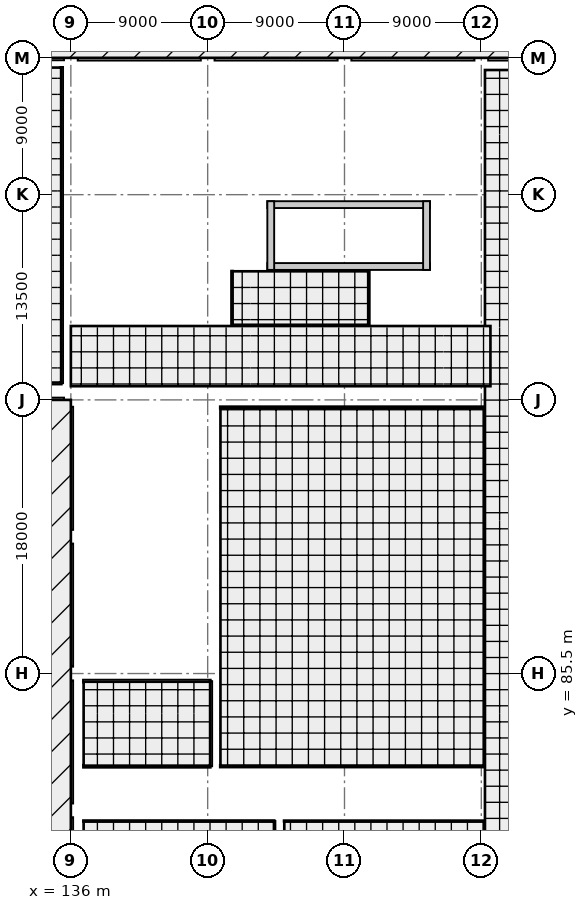
"""IFC4 building model, lengths in metres.
Left out: names, types, materials, properties, quantities, classifications, styles, units other than length and angle.
Written with IfcOpenShell. Run it as: python <this file> out.ifc"""

import sys

from ifc_helpers import new_model, si_unit, direction, frame, frame_2d, origin, origin_2d, place, context, subcontext, project, spatial, rectangle, extrude, element, fill, save


model = new_model("IFC4")
c1 = context("Model", 3, precision=1e-05, world=origin(), true_north=direction((0.0, 1.0)))
c2 = subcontext(c1, "Body", "Model", "MODEL_VIEW")
j1 = project(units=[si_unit("LENGTHUNIT", "METRE"), si_unit("PLANEANGLEUNIT", "RADIAN")], contexts=[c1])
p1 = place(None, origin())
s1 = spatial("IfcSite", under=j1, at=p1, CompositionType="ELEMENT")
p2 = place(p1, origin())
s2 = spatial("IfcBuilding", under=s1, at=p2, CompositionType="ELEMENT")
p3 = place(p2, origin())
s3 = spatial("IfcBuildingStorey", under=s2, at=p3, CompositionType="ELEMENT", Elevation=0.0)
for number, where, z_axis, x_axis in (
    (1, (136.0, 76.5, 0.0), (0.0, 0.0, 1.0), (1.0, 0.0, 0.0)),
    (2, (136.0, 85.5, 0.0), (0.0, 0.0, 1.0), (1.0, 0.0, 0.0)),
    (3, (136.0, 94.5, 0.0), (0.0, 0.0, 1.0), (1.0, 0.0, 0.0)),
    (4, (136.0, 103.5, 0.0), (0.0, 0.0, 1.0), (1.0, 0.0, 0.0)),
    (5, (136.0, 117.0, 0.0), (0.0, 0.0, 1.0), (1.0, 0.0, 0.0)),
    (6, (136.0, 126.0, 0.0), (0.0, 0.0, 1.0), (1.0, 0.0, 0.0)),
    (7, (145.0, 76.5, 0.0), (0.0, 0.0, 1.0), (1.0, 0.0, 0.0)),
    (8, (145.0, 85.5, 0.0), (0.0, 0.0, 1.0), (1.0, 0.0, 0.0)),
    (9, (145.0, 94.5, 0.0), (0.0, 0.0, 1.0), (1.0, 0.0, 0.0)),
    (10, (145.0, 103.5, 0.0), (0.0, 0.0, 1.0), (1.0, 0.0, 0.0)),
    (11, (145.0, 117.0, 0.0), (0.0, 0.0, 1.0), (1.0, 0.0, 0.0)),
    (12, (145.0, 126.0, 0.0), (0.0, 0.0, 1.0), (1.0, 0.0, 0.0)),
    (13, (154.0, 76.5, 0.0), (0.0, 0.0, 1.0), (1.0, 0.0, 0.0)),
    (14, (154.0, 85.5, 0.0), (0.0, 0.0, 1.0), (1.0, 0.0, 0.0)),
    (15, (154.0, 94.5, 0.0), (0.0, 0.0, 1.0), (1.0, 0.0, 0.0)),
    (16, (154.0, 103.5, 0.0), (0.0, 0.0, 1.0), (1.0, 0.0, 0.0)),
    (17, (154.0, 117.0, 0.0), (0.0, 0.0, 1.0), (1.0, 0.0, 0.0)),
    (18, (154.0, 126.0, 0.0), (0.0, 0.0, 1.0), (1.0, 0.0, 0.0)),
    (19, (163.0, 76.5, 0.0), (0.0, 0.0, 1.0), (1.0, 0.0, 0.0)),
    (20, (163.0, 85.5, 0.0), (0.0, 0.0, 1.0), (1.0, 0.0, 0.0)),
    (21, (163.0, 94.5, 0.0), (0.0, 0.0, 1.0), (1.0, 0.0, 0.0)),
    (22, (163.0, 103.5, 0.0), (0.0, 0.0, 1.0), (1.0, 0.0, 0.0)),
    (23, (163.0, 117.0, 0.0), (0.0, 0.0, 1.0), (1.0, 0.0, 0.0)),
    (24, (163.0, 126.0, 0.0), (0.0, 0.0, 1.0), (1.0, 0.0, 0.0)),
):
    element("IfcColumn", number, at=place(p3, frame(where, z_axis=z_axis, x_axis=x_axis)), inside=s3, PredefinedType="COLUMN", context=c2, shape_type="SweptSolid", body=[
        extrude(rectangle(XDim=0.9, YDim=0.9, at=origin_2d()), origin(), (0.0, 0.0, 1.0), 6.6),
    ])
p4 = place(p3, frame((126.45, 126.0, 0.0), z_axis=(0.0, 0.0, 1.0), x_axis=(1.0, 0.0, 0.0)))
e25 = element("IfcWall", 25, at=p4, inside=s3, PredefinedType="SOLIDWALL", context=c2, shape_type="SweptSolid", body=[
    extrude(rectangle(XDim=9.1, YDim=0.32, at=frame_2d((4.55, 0.0))), origin(), (0.0, 0.0, 1.0), 5.855),
])
p5 = place(p4, frame((3.35, 0.0, 0.0)))
e26 = element("IfcOpeningElement", 26, at=p5, cuts=e25, PredefinedType="OPENING", context=c2, shape_type="SweptSolid", body=[
    extrude(rectangle(XDim=2.4, YDim=2.5, at=frame_2d((1.2, 1.25))), frame((0.0, 0.17, 0.0), z_axis=(0.0, -1.0, 0.0), x_axis=(1.0, 0.0, 0.0)), (0.0, 0.0, 1.0), 0.34),
])
p6 = place(p3, frame((135.55, 103.5, 0.0), z_axis=(0.0, 0.0, 1.0), x_axis=(-1.0, 0.0, 0.0)))
e27 = element("IfcWall", 27, at=p6, inside=s3, PredefinedType="SOLIDWALL", context=c2, shape_type="SweptSolid", body=[
    extrude(rectangle(XDim=8.75, YDim=0.3, at=frame_2d((4.375, 0.0))), origin(), (0.0, 0.0, 1.0), 5.495),
])
p7 = place(p6, frame((3.2, 0.0, 0.95)))
e28 = element("IfcOpeningElement", 28, at=p7, cuts=e27, PredefinedType="OPENING", context=c2, shape_type="SweptSolid", body=[
    extrude(rectangle(XDim=2.7, YDim=2.1, at=frame_2d((1.35, 1.05))), frame((0.0, 0.16, 0.0), z_axis=(0.0, -1.0, 0.0), x_axis=(1.0, 0.0, 0.0)), (0.0, 0.0, 1.0), 0.32),
])
p8 = place(p3, frame((136.0, 67.95, 0.0), z_axis=(0.0, 0.0, 1.0), x_axis=(0.0, 1.0, 0.0)))
e29 = element("IfcWall", 29, at=p8, inside=s3, PredefinedType="SOLIDWALL", context=c2, shape_type="SweptSolid", body=[
    extrude(rectangle(XDim=8.1, YDim=0.3, at=frame_2d((4.05, 0.0))), origin(), (0.0, 0.0, 1.0), 5.77),
])
p9 = place(p8, frame((2.7, 0.0, 0.95)))
e30 = element("IfcOpeningElement", 30, at=p9, cuts=e29, PredefinedType="OPENING", context=c2, shape_type="SweptSolid", body=[
    extrude(rectangle(XDim=2.7, YDim=2.1, at=frame_2d((1.35, 1.05))), frame((0.0, 0.16, 0.0), z_axis=(0.0, -1.0, 0.0), x_axis=(1.0, 0.0, 0.0)), (0.0, 0.0, 1.0), 0.32),
])
p10 = place(p3, frame((136.0, 76.95, 0.0), z_axis=(0.0, 0.0, 1.0), x_axis=(0.0, 1.0, 0.0)))
e31 = element("IfcWall", 31, at=p10, inside=s3, PredefinedType="SOLIDWALL", context=c2, shape_type="SweptSolid", body=[
    extrude(rectangle(XDim=8.1, YDim=0.3, at=frame_2d((4.05, 0.0))), origin(), (0.0, 0.0, 1.0), 5.93),
])
p11 = place(p10, frame((2.85, 0.0, 0.95)))
e32 = element("IfcOpeningElement", 32, at=p11, cuts=e31, PredefinedType="OPENING", context=c2, shape_type="SweptSolid", body=[
    extrude(rectangle(XDim=2.4, YDim=2.1, at=frame_2d((1.2, 1.05))), frame((0.0, 0.16, 0.0), z_axis=(0.0, -1.0, 0.0), x_axis=(1.0, 0.0, 0.0)), (0.0, 0.0, 1.0), 0.32),
])
p12 = place(p3, frame((136.0, 85.95, 0.0), z_axis=(0.0, 0.0, 1.0), x_axis=(0.0, 1.0, 0.0)))
e33 = element("IfcWall", 33, at=p12, inside=s3, PredefinedType="SOLIDWALL", context=c2, shape_type="SweptSolid", body=[
    extrude(rectangle(XDim=8.1, YDim=0.3, at=frame_2d((4.05, 0.0))), origin(), (0.0, 0.0, 1.0), 5.93),
])
p13 = place(p12, frame((3.0, 0.0, 0.95)))
e34 = element("IfcOpeningElement", 34, at=p13, cuts=e33, PredefinedType="OPENING", context=c2, shape_type="SweptSolid", body=[
    extrude(rectangle(XDim=2.1, YDim=2.0, at=frame_2d((1.05, 1.0))), frame((0.0, 0.16, 0.0), z_axis=(0.0, -1.0, 0.0), x_axis=(1.0, 0.0, 0.0)), (0.0, 0.0, 1.0), 0.32),
])
p14 = place(p3, frame((136.0, 94.95, 0.0), z_axis=(0.0, 0.0, 1.0), x_axis=(0.0, 1.0, 0.0)))
e35 = element("IfcWall", 35, at=p14, inside=s3, PredefinedType="SOLIDWALL", context=c2, shape_type="SweptSolid", body=[
    extrude(rectangle(XDim=8.1, YDim=0.3, at=frame_2d((4.05, 0.0))), origin(), (0.0, 0.0, 1.0), 5.715),
])
p15 = place(p14, frame((3.15, 0.0, 0.0)))
e36 = element("IfcOpeningElement", 36, at=p15, cuts=e35, PredefinedType="OPENING", context=c2, shape_type="SweptSolid", body=[
    extrude(rectangle(XDim=1.8, YDim=2.35, at=frame_2d((0.9, 1.175))), frame((0.0, 0.16, 0.0), z_axis=(0.0, -1.0, 0.0), x_axis=(1.0, 0.0, 0.0)), (0.0, 0.0, 1.0), 0.32),
])
p16 = place(p3, frame((136.45, 126.0, 0.0), z_axis=(0.0, 0.0, 1.0), x_axis=(1.0, 0.0, 0.0)))
e37 = element("IfcWall", 37, at=p16, inside=s3, PredefinedType="SOLIDWALL", context=c2, shape_type="SweptSolid", body=[
    extrude(rectangle(XDim=8.1, YDim=0.36, at=frame_2d((4.05, 0.0))), origin(), (0.0, 0.0, 1.0), 5.855),
])
p17 = place(p16, frame((2.55, 0.0, 0.95)))
e38 = element("IfcOpeningElement", 38, at=p17, cuts=e37, PredefinedType="OPENING", context=c2, shape_type="SweptSolid", body=[
    extrude(rectangle(XDim=3.0, YDim=2.1, at=frame_2d((1.5, 1.05))), frame((0.0, 0.19, 0.0), z_axis=(0.0, -1.0, 0.0), x_axis=(1.0, 0.0, 0.0)), (0.0, 0.0, 1.0), 0.38),
])
p18 = place(p3, frame((145.45, 126.0, 0.0), z_axis=(0.0, 0.0, 1.0), x_axis=(1.0, 0.0, 0.0)))
e39 = element("IfcWall", 39, at=p18, inside=s3, PredefinedType="SOLIDWALL", context=c2, shape_type="SweptSolid", body=[
    extrude(rectangle(XDim=8.1, YDim=0.36, at=frame_2d((4.05, 0.0))), origin(), (0.0, 0.0, 1.0), 5.855),
])
p19 = place(p18, frame((2.7, 0.0, 0.95)))
e40 = element("IfcOpeningElement", 40, at=p19, cuts=e39, PredefinedType="OPENING", context=c2, shape_type="SweptSolid", body=[
    extrude(rectangle(XDim=2.7, YDim=2.1, at=frame_2d((1.35, 1.05))), frame((0.0, 0.19, 0.0), z_axis=(0.0, -1.0, 0.0), x_axis=(1.0, 0.0, 0.0)), (0.0, 0.0, 1.0), 0.38),
])
p20 = place(p3, frame((154.45, 126.0, 0.0), z_axis=(0.0, 0.0, 1.0), x_axis=(1.0, 0.0, 0.0)))
e41 = element("IfcWall", 41, at=p20, inside=s3, PredefinedType="SOLIDWALL", context=c2, shape_type="SweptSolid", body=[
    extrude(rectangle(XDim=8.1, YDim=0.36, at=frame_2d((4.05, 0.0))), origin(), (0.0, 0.0, 1.0), 5.875),
])
p21 = place(p20, frame((2.85, 0.0, 0.0)))
e42 = element("IfcOpeningElement", 42, at=p21, cuts=e41, PredefinedType="OPENING", context=c2, shape_type="SweptSolid", body=[
    extrude(rectangle(XDim=2.4, YDim=2.5, at=frame_2d((1.2, 1.25))), frame((0.0, 0.19, 0.0), z_axis=(0.0, -1.0, 0.0), x_axis=(1.0, 0.0, 0.0)), (0.0, 0.0, 1.0), 0.38),
])
p22 = place(p3, frame((163.45, 126.0, 0.0), z_axis=(0.0, 0.0, 1.0), x_axis=(1.0, 0.0, 0.0)))
e43 = element("IfcWall", 43, at=p22, inside=s3, PredefinedType="SOLIDWALL", context=c2, shape_type="SweptSolid", body=[
    extrude(rectangle(XDim=8.1, YDim=0.36, at=frame_2d((4.05, 0.0))), origin(), (0.0, 0.0, 1.0), 5.875),
])
p23 = place(p22, frame((2.85, 0.0, 0.0)))
e44 = element("IfcOpeningElement", 44, at=p23, cuts=e43, PredefinedType="OPENING", context=c2, shape_type="SweptSolid", body=[
    extrude(rectangle(XDim=2.4, YDim=2.5, at=frame_2d((1.2, 1.25))), frame((0.0, 0.19, 0.0), z_axis=(0.0, -1.0, 0.0), x_axis=(1.0, 0.0, 0.0)), (0.0, 0.0, 1.0), 0.38),
])
p24 = place(p3, frame((148.925, 112.275, 0.0), z_axis=(0.0, 0.0, 1.0), x_axis=(1.0, 0.0, 0.0)))
e45 = element("IfcWall", 45, at=p24, inside=s3, PredefinedType="SHEAR", context=c2, shape_type="SweptSolid", body=[
    extrude(rectangle(XDim=10.698, YDim=0.45, at=frame_2d((5.349, 0.0))), origin(), (0.0, 0.0, 1.0), 6.36),
])
p25 = place(p24, frame((0.55, 0.0, 0.0)))
e46 = element("IfcOpeningElement", 46, at=p25, cuts=e45, PredefinedType="OPENING", context=c2, shape_type="SweptSolid", body=[
    extrude(rectangle(XDim=1.3, YDim=2.1, at=frame_2d((0.65, 1.05))), frame((0.0, 0.235, 0.0), z_axis=(0.0, -1.0, 0.0), x_axis=(1.0, 0.0, 0.0)), (0.0, 0.0, 1.0), 0.47),
])
p26 = place(p3, frame((159.623, 116.345, 0.0), z_axis=(0.0, 0.0, 1.0), x_axis=(-1.0, 0.0, 0.0)))
e47 = element("IfcWall", 47, at=p26, inside=s3, PredefinedType="SHEAR", context=c2, shape_type="SweptSolid", body=[
    extrude(rectangle(XDim=10.698, YDim=0.45, at=frame_2d((5.349, 0.0))), origin(), (0.0, 0.0, 1.0), 6.36),
])
for number, where, z_axis, x_axis in (
    (48, (159.397, 112.05, 0.0), (0.0, 0.0, 1.0), (0.0, 1.0, 0.0)),
    (49, (149.15, 116.57, 0.0), (0.0, 0.0, 1.0), (0.0, -1.0, 0.0)),
):
    element("IfcWall", number, at=place(p3, frame(where, z_axis=z_axis, x_axis=x_axis)), inside=s3, PredefinedType="SHEAR", context=c2, shape_type="SweptSolid", body=[
        extrude(rectangle(XDim=4.52, YDim=0.45, at=frame_2d((2.26, 0.0))), origin(), (0.0, 0.0, 1.0), 6.36),
    ])
p27 = place(p3, frame((135.4, 104.6, 0.0), z_axis=(0.0, 0.0, 1.0), x_axis=(-1.0, 0.0, 0.0)))
e50 = element("IfcWall", 50, at=p27, inside=s3, PredefinedType="PARTITIONING", context=c2, shape_type="SweptSolid", body=[
    extrude(rectangle(XDim=27.0, YDim=0.175, at=frame_2d((13.5, 0.0))), origin(), (0.0, 0.0, 1.0), 4.4),
])
p28 = place(p3, frame((135.4, 125.4, 0.0), z_axis=(0.0, 0.0, 1.0), x_axis=(0.0, -1.0, 0.0)))
e51 = element("IfcWall", 51, at=p28, inside=s3, PredefinedType="PARTITIONING", context=c2, shape_type="SweptSolid", body=[
    extrude(rectangle(XDim=20.8, YDim=0.175, at=frame_2d((10.4, 0.0))), origin(), (0.0, 0.0, 1.0), 4.4),
])
p29 = place(p28, frame((9.725, 0.0, 0.0)))
e52 = element("IfcOpeningElement", 52, at=p29, cuts=e51, PredefinedType="OPENING", context=c2, shape_type="SweptSolid", body=[
    extrude(rectangle(XDim=1.35, YDim=2.1, at=frame_2d((0.675, 1.05))), frame((0.0, 0.097, 0.0), z_axis=(0.0, -1.0, 0.0), x_axis=(1.0, 0.0, 0.0)), (0.0, 0.0, 1.0), 0.195),
])
p30 = place(p3, frame((136.8, 75.8, 0.0), z_axis=(0.0, 0.0, 1.0), x_axis=(1.0, 0.0, 0.0)))
e53 = element("IfcWall", 53, at=p30, inside=s3, PredefinedType="PARTITIONING", context=c2, shape_type="SweptSolid", body=[
    extrude(rectangle(XDim=12.6, YDim=0.11, at=frame_2d((6.3, 0.0))), origin(), (0.0, 0.0, 1.0), 4.4),
])
p31 = place(p30, frame((5.85, 0.0, 0.0)))
e54 = element("IfcOpeningElement", 54, at=p31, cuts=e53, PredefinedType="OPENING", context=c2, shape_type="SweptSolid", body=[
    extrude(rectangle(XDim=0.9, YDim=2.1, at=frame_2d((0.45, 1.05))), frame((0.0, 0.065, 0.0), z_axis=(0.0, -1.0, 0.0), x_axis=(1.0, 0.0, 0.0)), (0.0, 0.0, 1.0), 0.13),
])
p32 = place(p3, frame((149.4, 75.8, 0.0), z_axis=(0.0, 0.0, 1.0), x_axis=(0.0, -1.0, 0.0)))
e55 = element("IfcWall", 55, at=p32, inside=s3, PredefinedType="PARTITIONING", context=c2, shape_type="SweptSolid", body=[
    extrude(rectangle(XDim=8.2, YDim=0.11, at=frame_2d((4.1, 0.0))), origin(), (0.0, 0.0, 1.0), 4.4),
])
p33 = place(p3, frame((150.0, 75.8, 0.0), z_axis=(0.0, 0.0, 1.0), x_axis=(1.0, 0.0, 0.0)))
e56 = element("IfcWall", 56, at=p33, inside=s3, PredefinedType="PARTITIONING", context=c2, shape_type="SweptSolid", body=[
    extrude(rectangle(XDim=13.2, YDim=0.1, at=frame_2d((6.6, 0.0))), origin(), (0.0, 0.0, 1.0), 4.4),
])
p34 = place(p33, frame((6.15, 0.0, 0.0)))
e57 = element("IfcOpeningElement", 57, at=p34, cuts=e56, PredefinedType="OPENING", context=c2, shape_type="SweptSolid", body=[
    extrude(rectangle(XDim=0.9, YDim=2.1, at=frame_2d((0.45, 1.05))), frame((0.0, 0.06, 0.0), z_axis=(0.0, -1.0, 0.0), x_axis=(1.0, 0.0, 0.0)), (0.0, 0.0, 1.0), 0.12),
])
p35 = place(p3, frame((163.2, 75.8, 0.0), z_axis=(0.0, 0.0, 1.0), x_axis=(0.0, -1.0, 0.0)))
e58 = element("IfcWall", 58, at=p35, inside=s3, PredefinedType="PARTITIONING", context=c2, shape_type="SweptSolid", body=[
    extrude(rectangle(XDim=8.2, YDim=0.1, at=frame_2d((4.1, 0.0))), origin(), (0.0, 0.0, 1.0), 4.4),
])
p36 = place(p3, frame((145.2, 79.4, 0.0), z_axis=(0.0, 0.0, 1.0), x_axis=(-1.0, 0.0, 0.0)))
e59 = element("IfcWall", 59, at=p36, inside=s3, PredefinedType="PARTITIONING", context=c2, shape_type="SweptSolid", body=[
    extrude(rectangle(XDim=8.4, YDim=0.19, at=frame_2d((4.2, 0.0))), origin(), (0.0, 0.0, 1.0), 4.4),
])
p37 = place(p36, frame((3.69, 0.0, 0.0)))
e60 = element("IfcOpeningElement", 60, at=p37, cuts=e59, PredefinedType="OPENING", context=c2, shape_type="SweptSolid", body=[
    extrude(rectangle(XDim=1.02, YDim=2.05, at=frame_2d((0.51, 1.025))), frame((0.0, 0.105, 0.0), z_axis=(0.0, -1.0, 0.0), x_axis=(1.0, 0.0, 0.0)), (0.0, 0.0, 1.0), 0.21),
])
p38 = place(p3, frame((136.8, 85.0, 0.0), z_axis=(0.0, 0.0, 1.0), x_axis=(1.0, 0.0, 0.0)))
e61 = element("IfcWall", 61, at=p38, inside=s3, PredefinedType="PARTITIONING", context=c2, shape_type="SweptSolid", body=[
    extrude(rectangle(XDim=8.4, YDim=0.19, at=frame_2d((4.2, 0.0))), origin(), (0.0, 0.0, 1.0), 4.4),
])
p39 = place(p3, frame((145.2, 85.0, 0.0), z_axis=(0.0, 0.0, 1.0), x_axis=(0.0, -1.0, 0.0)))
e62 = element("IfcWall", 62, at=p39, inside=s3, PredefinedType="PARTITIONING", context=c2, shape_type="SweptSolid", body=[
    extrude(rectangle(XDim=5.6, YDim=0.19, at=frame_2d((2.8, 0.0))), origin(), (0.0, 0.0, 1.0), 4.4),
])
for number, where, z_axis, x_axis in (
    (63, (163.2, 79.4, 0.0), (0.0, 0.0, 1.0), (-1.0, 0.0, 0.0)),
    (64, (145.8, 103.0, 0.0), (0.0, 0.0, 1.0), (1.0, 0.0, 0.0)),
):
    element("IfcWall", number, at=place(p3, frame(where, z_axis=z_axis, x_axis=x_axis)), inside=s3, PredefinedType="PARTITIONING", context=c2, shape_type="SweptSolid", body=[
        extrude(rectangle(XDim=17.4, YDim=0.16, at=frame_2d((8.7, 0.0))), origin(), (0.0, 0.0, 1.0), 4.4),
    ])
p40 = place(p3, frame((163.2, 103.0, 0.0), z_axis=(0.0, 0.0, 1.0), x_axis=(0.0, -1.0, 0.0)))
e65 = element("IfcWall", 65, at=p40, inside=s3, PredefinedType="PARTITIONING", context=c2, shape_type="SweptSolid", body=[
    extrude(rectangle(XDim=23.6, YDim=0.16, at=frame_2d((11.8, 0.0))), origin(), (0.0, 0.0, 1.0), 4.4),
])
p41 = place(p40, frame((11.225, 0.0, 0.0)))
e66 = element("IfcOpeningElement", 66, at=p41, cuts=e65, PredefinedType="OPENING", context=c2, shape_type="SweptSolid", body=[
    extrude(rectangle(XDim=1.15, YDim=2.1, at=frame_2d((0.575, 1.05))), frame((0.0, 0.09, 0.0), z_axis=(0.0, -1.0, 0.0), x_axis=(1.0, 0.0, 0.0)), (0.0, 0.0, 1.0), 0.18),
])
p42 = place(p3, frame((155.6, 108.4, 0.0), z_axis=(0.0, 0.0, 1.0), x_axis=(-1.0, 0.0, 0.0)))
e67 = element("IfcWall", 67, at=p42, inside=s3, PredefinedType="PARTITIONING", context=c2, shape_type="SweptSolid", body=[
    extrude(rectangle(XDim=9.0, YDim=0.12, at=frame_2d((4.5, 0.0))), origin(), (0.0, 0.0, 1.0), 4.4),
])
p43 = place(p42, frame((3.875, 0.0, 0.0)))
e68 = element("IfcOpeningElement", 68, at=p43, cuts=e67, PredefinedType="OPENING", context=c2, shape_type="SweptSolid", body=[
    extrude(rectangle(XDim=1.25, YDim=2.1, at=frame_2d((0.625, 1.05))), frame((0.0, 0.07, 0.0), z_axis=(0.0, -1.0, 0.0), x_axis=(1.0, 0.0, 0.0)), (0.0, 0.0, 1.0), 0.14),
])
for number, where, z_axis, x_axis in (
    (69, (146.6, 108.4, 0.0), (0.0, 0.0, 1.0), (0.0, 1.0, 0.0)),
    (70, (155.6, 112.0, 0.0), (0.0, 0.0, 1.0), (0.0, -1.0, 0.0)),
):
    element("IfcWall", number, at=place(p3, frame(where, z_axis=z_axis, x_axis=x_axis)), inside=s3, PredefinedType="PARTITIONING", context=c2, shape_type="SweptSolid", body=[
        extrude(rectangle(XDim=3.6, YDim=0.12, at=frame_2d((1.8, 0.0))), origin(), (0.0, 0.0, 1.0), 4.4),
    ])
p44 = place(p11, origin())
e71 = element("IfcWindow", 71, at=p44, inside=s3, PartitioningType="SINGLE_PANEL", PredefinedType="WINDOW", context=c2, shape_type="SweptSolid", body=[
    extrude(rectangle(XDim=2.4, YDim=2.1, at=frame_2d((1.2, 1.05))), frame((0.0, 0.03, 0.0), z_axis=(0.0, -1.0, 0.0), x_axis=(1.0, 0.0, 0.0)), (0.0, 0.0, 1.0), 0.06),
])
fill(e32, e71)
p45 = place(p13, origin())
e72 = element("IfcWindow", 72, at=p45, inside=s3, PartitioningType="SINGLE_PANEL", PredefinedType="WINDOW", context=c2, shape_type="SweptSolid", body=[
    extrude(rectangle(XDim=2.1, YDim=2.0, at=frame_2d((1.05, 1.0))), frame((0.0, 0.03, 0.0), z_axis=(0.0, -1.0, 0.0), x_axis=(1.0, 0.0, 0.0)), (0.0, 0.0, 1.0), 0.06),
])
fill(e34, e72)
p46 = place(p15, origin())
e73 = element("IfcDoor", 73, at=p46, inside=s3, OperationType="SINGLE_SWING_LEFT", PredefinedType="DOOR", context=c2, shape_type="SweptSolid", body=[
    extrude(rectangle(XDim=1.8, YDim=2.35, at=frame_2d((0.9, 1.175))), frame((0.0, 0.025, 0.0), z_axis=(0.0, -1.0, 0.0), x_axis=(1.0, 0.0, 0.0)), (0.0, 0.0, 1.0), 0.05),
])
fill(e36, e73)
p47 = place(p17, origin())
e74 = element("IfcWindow", 74, at=p47, inside=s3, PartitioningType="SINGLE_PANEL", PredefinedType="WINDOW", context=c2, shape_type="SweptSolid", body=[
    extrude(rectangle(XDim=3.0, YDim=2.1, at=frame_2d((1.5, 1.05))), frame((0.0, 0.03, 0.0), z_axis=(0.0, -1.0, 0.0), x_axis=(1.0, 0.0, 0.0)), (0.0, 0.0, 1.0), 0.06),
])
fill(e38, e74)
p48 = place(p19, origin())
e75 = element("IfcWindow", 75, at=p48, inside=s3, PartitioningType="SINGLE_PANEL", PredefinedType="WINDOW", context=c2, shape_type="SweptSolid", body=[
    extrude(rectangle(XDim=2.7, YDim=2.1, at=frame_2d((1.35, 1.05))), frame((0.0, 0.03, 0.0), z_axis=(0.0, -1.0, 0.0), x_axis=(1.0, 0.0, 0.0)), (0.0, 0.0, 1.0), 0.06),
])
fill(e40, e75)
p49 = place(p21, origin())
e76 = element("IfcDoor", 76, at=p49, inside=s3, OperationType="SINGLE_SWING_LEFT", PredefinedType="DOOR", context=c2, shape_type="SweptSolid", body=[
    extrude(rectangle(XDim=2.4, YDim=2.5, at=frame_2d((1.2, 1.25))), frame((0.0, 0.025, 0.0), z_axis=(0.0, -1.0, 0.0), x_axis=(1.0, 0.0, 0.0)), (0.0, 0.0, 1.0), 0.05),
])
fill(e42, e76)
p50 = place(p25, origin())
e77 = element("IfcDoor", 77, at=p50, inside=s3, OperationType="SINGLE_SWING_RIGHT", PredefinedType="DOOR", context=c2, shape_type="SweptSolid", body=[
    extrude(rectangle(XDim=1.3, YDim=2.1, at=frame_2d((0.65, 1.05))), frame((0.0, 0.025, 0.0), z_axis=(0.0, -1.0, 0.0), x_axis=(1.0, 0.0, 0.0)), (0.0, 0.0, 1.0), 0.05),
])
fill(e46, e77)
p51 = place(p29, origin())
e78 = element("IfcDoor", 78, at=p51, inside=s3, OperationType="SINGLE_SWING_RIGHT", PredefinedType="DOOR", context=c2, shape_type="SweptSolid", body=[
    extrude(rectangle(XDim=1.35, YDim=2.1, at=frame_2d((0.675, 1.05))), frame((0.0, 0.025, 0.0), z_axis=(0.0, -1.0, 0.0), x_axis=(1.0, 0.0, 0.0)), (0.0, 0.0, 1.0), 0.05),
])
fill(e52, e78)
p52 = place(p31, origin())
e79 = element("IfcDoor", 79, at=p52, inside=s3, OperationType="SINGLE_SWING_LEFT", PredefinedType="DOOR", context=c2, shape_type="SweptSolid", body=[
    extrude(rectangle(XDim=0.9, YDim=2.1, at=frame_2d((0.45, 1.05))), frame((0.0, 0.025, 0.0), z_axis=(0.0, -1.0, 0.0), x_axis=(1.0, 0.0, 0.0)), (0.0, 0.0, 1.0), 0.05),
])
fill(e54, e79)
p53 = place(p34, origin())
e80 = element("IfcDoor", 80, at=p53, inside=s3, OperationType="SINGLE_SWING_RIGHT", PredefinedType="DOOR", context=c2, shape_type="SweptSolid", body=[
    extrude(rectangle(XDim=0.9, YDim=2.1, at=frame_2d((0.45, 1.05))), frame((0.0, 0.025, 0.0), z_axis=(0.0, -1.0, 0.0), x_axis=(1.0, 0.0, 0.0)), (0.0, 0.0, 1.0), 0.05),
])
fill(e57, e80)
p54 = place(p37, origin())
e81 = element("IfcDoor", 81, at=p54, inside=s3, OperationType="SINGLE_SWING_LEFT", PredefinedType="DOOR", context=c2, shape_type="SweptSolid", body=[
    extrude(rectangle(XDim=1.02, YDim=2.05, at=frame_2d((0.51, 1.025))), frame((0.0, 0.025, 0.0), z_axis=(0.0, -1.0, 0.0), x_axis=(1.0, 0.0, 0.0)), (0.0, 0.0, 1.0), 0.05),
])
fill(e60, e81)
p55 = place(p41, origin())
e82 = element("IfcDoor", 82, at=p55, inside=s3, OperationType="SINGLE_SWING_RIGHT", PredefinedType="DOOR", context=c2, shape_type="SweptSolid", body=[
    extrude(rectangle(XDim=1.15, YDim=2.1, at=frame_2d((0.575, 1.05))), frame((0.0, 0.025, 0.0), z_axis=(0.0, -1.0, 0.0), x_axis=(1.0, 0.0, 0.0)), (0.0, 0.0, 1.0), 0.05),
])
fill(e66, e82)
p56 = place(p43, origin())
e83 = element("IfcDoor", 83, at=p56, inside=s3, OperationType="SINGLE_SWING_RIGHT", PredefinedType="DOOR", context=c2, shape_type="SweptSolid", body=[
    extrude(rectangle(XDim=1.25, YDim=2.1, at=frame_2d((0.625, 1.05))), frame((0.0, 0.025, 0.0), z_axis=(0.0, -1.0, 0.0), x_axis=(1.0, 0.0, 0.0)), (0.0, 0.0, 1.0), 0.05),
])
fill(e68, e83)
save(model, sys.argv[1])
